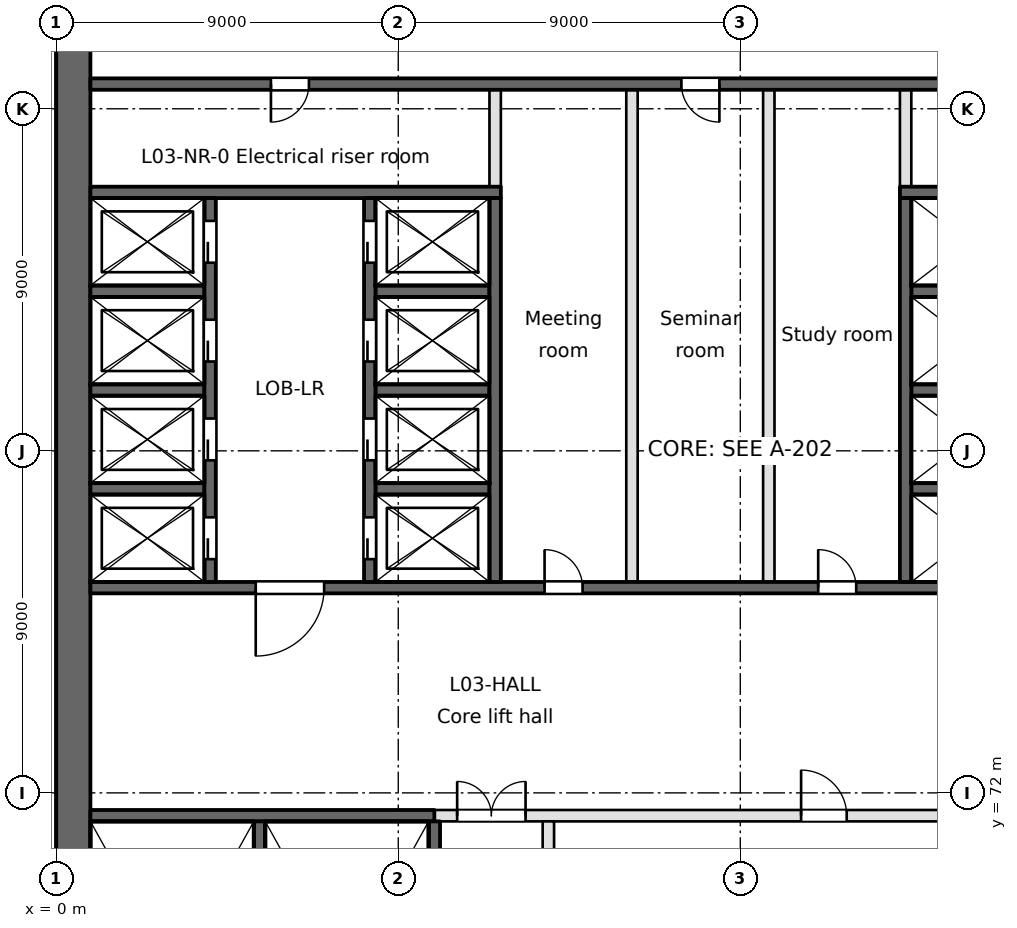
"""IFC4 building model, lengths in metres.
Left out: names, types, materials, properties, quantities, classifications, styles, units other than length and angle.
Written with IfcOpenShell. Run it as: python <this file> out.ifc"""

import sys

from ifc_helpers import new_model, si_unit, direction, frame, frame_2d, origin, place, context, subcontext, project, spatial, rectangle, extrude, element, fill, save


model = new_model("IFC4")
c1 = context("Model", 3, precision=1e-05, world=origin(), true_north=direction((0.0, 1.0)))
c2 = subcontext(c1, "Body", "Model", "MODEL_VIEW")
j1 = project(units=[si_unit("LENGTHUNIT", "METRE"), si_unit("PLANEANGLEUNIT", "RADIAN")], contexts=[c1])
p1 = place(None, origin())
s1 = spatial("IfcSite", under=j1, at=p1, CompositionType="ELEMENT")
p2 = place(p1, origin())
s2 = spatial("IfcBuilding", under=s1, at=p2, CompositionType="ELEMENT")
p3 = place(p2, frame((0.0, 0.0, 16.8)))
s3 = spatial("IfcBuildingStorey", under=s2, at=p3, CompositionType="ELEMENT", Elevation=16.8)
p4 = place(p3, frame((0.45, 94.5, 0.0), z_axis=(0.0, 0.0, 1.0), x_axis=(0.0, -1.0, 0.0)))
e1 = element("IfcWall", 1, at=p4, inside=s3, PredefinedType="SHEAR", context=c2, shape_type="SweptSolid", body=[
    extrude(rectangle(XDim=66.085, YDim=0.9, at=frame_2d((33.042, 0.0))), origin(), (0.0, 0.0, 1.0), 4.8),
])
p5 = place(p3, frame((0.9, 71.4, -0.35), z_axis=(0.0, 0.0, 1.0), x_axis=(1.0, 0.0, 0.0)))
e2 = element("IfcWall", 2, at=p5, inside=s3, PredefinedType="SOLIDWALL", context=c2, shape_type="SweptSolid", body=[
    extrude(rectangle(XDim=9.05, YDim=0.3, at=frame_2d((4.525, 0.0))), origin(), (0.0, 0.0, 1.0), 4.8),
])
p6 = place(p3, frame((9.95, 71.4, 0.0), z_axis=(0.0, 0.0, 1.0), x_axis=(1.0, 0.0, 0.0)))
e3 = element("IfcWall", 3, at=p6, inside=s3, PredefinedType="PARTITIONING", context=c2, shape_type="SweptSolid", body=[
    extrude(rectangle(XDim=17.65, YDim=0.3, at=frame_2d((8.825, 0.0))), origin(), (0.0, 0.0, 1.0), 4.45),
])
p7 = place(p6, frame((0.6, 0.0, 0.0)))
e4 = element("IfcOpeningElement", 4, at=p7, cuts=e3, PredefinedType="OPENING", context=c2, shape_type="SweptSolid", body=[
    extrude(rectangle(XDim=1.8, YDim=2.1, at=frame_2d((0.9, 1.05))), frame((0.0, 0.15, 0.0), z_axis=(0.0, -1.0, 0.0), x_axis=(1.0, 0.0, 0.0)), (0.0, 0.0, 1.0), 0.3),
])
p8 = place(p6, frame((9.65, 0.0, 0.0)))
e5 = element("IfcOpeningElement", 5, at=p8, cuts=e3, PredefinedType="OPENING", context=c2, shape_type="SweptSolid", body=[
    extrude(rectangle(XDim=1.2, YDim=2.1, at=frame_2d((0.6, 1.05))), frame((0.0, 0.15, 0.0), z_axis=(0.0, -1.0, 0.0), x_axis=(1.0, 0.0, 0.0)), (0.0, 0.0, 1.0), 0.3),
])
p9 = place(p3, frame((0.9, 77.4, -0.35), z_axis=(0.0, 0.0, 1.0), x_axis=(1.0, 0.0, 0.0)))
e6 = element("IfcWall", 6, at=p9, inside=s3, PredefinedType="SOLIDWALL", context=c2, shape_type="SweptSolid", body=[
    extrude(rectangle(XDim=28.95, YDim=0.3, at=frame_2d((14.475, 0.0))), origin(), (0.0, 0.0, 1.0), 4.8),
])
p10 = place(p9, frame((4.35, 0.0, 0.35)))
e7 = element("IfcOpeningElement", 7, at=p10, cuts=e6, PredefinedType="OPENING", context=c2, shape_type="SweptSolid", body=[
    extrude(rectangle(XDim=1.8, YDim=2.1, at=frame_2d((0.9, 1.05))), frame((0.0, 0.15, 0.0), z_axis=(0.0, -1.0, 0.0), x_axis=(1.0, 0.0, 0.0)), (0.0, 0.0, 1.0), 0.3),
])
p11 = place(p9, frame((25.95, 0.0, 0.35)))
e8 = element("IfcOpeningElement", 8, at=p11, cuts=e6, PredefinedType="OPENING", context=c2, shape_type="SweptSolid", body=[
    extrude(rectangle(XDim=1.8, YDim=2.1, at=frame_2d((0.9, 1.05))), frame((0.0, 0.15, 0.0), z_axis=(0.0, -1.0, 0.0), x_axis=(1.0, 0.0, 0.0)), (0.0, 0.0, 1.0), 0.3),
])
p12 = place(p9, frame((11.95, 0.0, 0.35)))
e9 = element("IfcOpeningElement", 9, at=p12, cuts=e6, PredefinedType="OPENING", context=c2, shape_type="SweptSolid", body=[
    extrude(rectangle(XDim=1.0, YDim=2.1, at=frame_2d((0.5, 1.05))), frame((0.0, 0.15, 0.0), z_axis=(0.0, -1.0, 0.0), x_axis=(1.0, 0.0, 0.0)), (0.0, 0.0, 1.0), 0.3),
])
p13 = place(p9, frame((19.15, 0.0, 0.35)))
e10 = element("IfcOpeningElement", 10, at=p13, cuts=e6, PredefinedType="OPENING", context=c2, shape_type="SweptSolid", body=[
    extrude(rectangle(XDim=1.0, YDim=2.1, at=frame_2d((0.5, 1.05))), frame((0.0, 0.15, 0.0), z_axis=(0.0, -1.0, 0.0), x_axis=(1.0, 0.0, 0.0)), (0.0, 0.0, 1.0), 0.3),
])
for number, where, z_axis, x_axis in (
    (11, (0.9, 80.0, -0.35), (0.0, 0.0, 1.0), (1.0, 0.0, 0.0)),
    (12, (8.4, 80.0, -0.35), (0.0, 0.0, 1.0), (1.0, 0.0, 0.0)),
    (13, (22.5, 80.0, -0.35), (0.0, 0.0, 1.0), (1.0, 0.0, 0.0)),
    (14, (0.9, 82.6, -0.35), (0.0, 0.0, 1.0), (1.0, 0.0, 0.0)),
    (15, (8.4, 82.6, -0.35), (0.0, 0.0, 1.0), (1.0, 0.0, 0.0)),
    (16, (22.5, 82.6, -0.35), (0.0, 0.0, 1.0), (1.0, 0.0, 0.0)),
    (17, (0.9, 85.2, -0.35), (0.0, 0.0, 1.0), (1.0, 0.0, 0.0)),
    (18, (8.4, 85.2, -0.35), (0.0, 0.0, 1.0), (1.0, 0.0, 0.0)),
    (19, (22.5, 85.2, -0.35), (0.0, 0.0, 1.0), (1.0, 0.0, 0.0)),
):
    element("IfcWall", number, at=place(p3, frame(where, z_axis=z_axis, x_axis=x_axis)), inside=s3, PredefinedType="SOLIDWALL", context=c2, shape_type="SweptSolid", body=[
        extrude(rectangle(XDim=3.0, YDim=0.3, at=frame_2d((1.5, 0.0))), origin(), (0.0, 0.0, 1.0), 4.8),
    ])
p14 = place(p3, frame((0.9, 87.8, -0.35), z_axis=(0.0, 0.0, 1.0), x_axis=(1.0, 0.0, 0.0)))
e20 = element("IfcWall", 20, at=p14, inside=s3, PredefinedType="SOLIDWALL", context=c2, shape_type="SweptSolid", body=[
    extrude(rectangle(XDim=10.8, YDim=0.3, at=frame_2d((5.4, 0.0))), origin(), (0.0, 0.0, 1.0), 4.8),
])
p15 = place(p3, frame((22.2, 87.8, -0.35), z_axis=(0.0, 0.0, 1.0), x_axis=(1.0, 0.0, 0.0)))
e21 = element("IfcWall", 21, at=p15, inside=s3, PredefinedType="SOLIDWALL", context=c2, shape_type="SweptSolid", body=[
    extrude(rectangle(XDim=7.8, YDim=0.3, at=frame_2d((3.9, 0.0))), origin(), (0.0, 0.0, 1.0), 4.8),
])
p16 = place(p3, frame((0.9, 90.65, -0.35), z_axis=(0.0, 0.0, 1.0), x_axis=(1.0, 0.0, 0.0)))
e22 = element("IfcWall", 22, at=p16, inside=s3, PredefinedType="SOLIDWALL", context=c2, shape_type="SweptSolid", body=[
    extrude(rectangle(XDim=34.6, YDim=0.3, at=frame_2d((17.3, 0.0))), origin(), (0.0, 0.0, 1.0), 4.8),
])
p17 = place(p16, frame((4.75, 0.0, 0.35)))
e23 = element("IfcOpeningElement", 23, at=p17, cuts=e22, PredefinedType="OPENING", context=c2, shape_type="SweptSolid", body=[
    extrude(rectangle(XDim=1.0, YDim=2.1, at=frame_2d((0.5, 1.05))), frame((0.0, 0.15, 0.0), z_axis=(0.0, -1.0, 0.0), x_axis=(1.0, 0.0, 0.0)), (0.0, 0.0, 1.0), 0.3),
])
p18 = place(p16, frame((24.7, 0.0, 0.35)))
e24 = element("IfcOpeningElement", 24, at=p18, cuts=e22, PredefinedType="OPENING", context=c2, shape_type="SweptSolid", body=[
    extrude(rectangle(XDim=1.0, YDim=2.1, at=frame_2d((0.5, 1.05))), frame((0.0, 0.15, 0.0), z_axis=(0.0, -1.0, 0.0), x_axis=(1.0, 0.0, 0.0)), (0.0, 0.0, 1.0), 0.3),
])
p19 = place(p16, frame((15.55, 0.0, 0.35)))
e25 = element("IfcOpeningElement", 25, at=p19, cuts=e22, PredefinedType="OPENING", context=c2, shape_type="SweptSolid", body=[
    extrude(rectangle(XDim=1.0, YDim=2.1, at=frame_2d((0.5, 1.05))), frame((0.0, 0.15, 0.0), z_axis=(0.0, -1.0, 0.0), x_axis=(1.0, 0.0, 0.0)), (0.0, 0.0, 1.0), 0.3),
])
p20 = place(p16, frame((31.4, 0.0, 0.35)))
e26 = element("IfcOpeningElement", 26, at=p20, cuts=e22, PredefinedType="OPENING", context=c2, shape_type="SweptSolid", body=[
    extrude(rectangle(XDim=1.0, YDim=2.1, at=frame_2d((0.5, 1.05))), frame((0.0, 0.15, 0.0), z_axis=(0.0, -1.0, 0.0), x_axis=(1.0, 0.0, 0.0)), (0.0, 0.0, 1.0), 0.3),
])
p21 = place(p3, frame((4.05, 77.55, -0.35), z_axis=(0.0, 0.0, 1.0), x_axis=(0.0, 1.0, 0.0)))
e27 = element("IfcWall", 27, at=p21, inside=s3, PredefinedType="SOLIDWALL", context=c2, shape_type="SweptSolid", body=[
    extrude(rectangle(XDim=10.1, YDim=0.3, at=frame_2d((5.05, 0.0))), origin(), (0.0, 0.0, 1.0), 4.8),
])
p22 = place(p21, frame((0.6, 0.0, 0.35)))
e28 = element("IfcOpeningElement", 28, at=p22, cuts=e27, PredefinedType="OPENING", context=c2, shape_type="SweptSolid", body=[
    extrude(rectangle(XDim=1.1, YDim=2.1, at=frame_2d((0.55, 1.05))), frame((0.0, 0.15, 0.0), z_axis=(0.0, -1.0, 0.0), x_axis=(1.0, 0.0, 0.0)), (0.0, 0.0, 1.0), 0.3),
])
p23 = place(p21, frame((3.2, 0.0, 0.35)))
e29 = element("IfcOpeningElement", 29, at=p23, cuts=e27, PredefinedType="OPENING", context=c2, shape_type="SweptSolid", body=[
    extrude(rectangle(XDim=1.1, YDim=2.1, at=frame_2d((0.55, 1.05))), frame((0.0, 0.15, 0.0), z_axis=(0.0, -1.0, 0.0), x_axis=(1.0, 0.0, 0.0)), (0.0, 0.0, 1.0), 0.3),
])
p24 = place(p21, frame((5.8, 0.0, 0.35)))
e30 = element("IfcOpeningElement", 30, at=p24, cuts=e27, PredefinedType="OPENING", context=c2, shape_type="SweptSolid", body=[
    extrude(rectangle(XDim=1.1, YDim=2.1, at=frame_2d((0.55, 1.05))), frame((0.0, 0.15, 0.0), z_axis=(0.0, -1.0, 0.0), x_axis=(1.0, 0.0, 0.0)), (0.0, 0.0, 1.0), 0.3),
])
p25 = place(p21, frame((8.4, 0.0, 0.35)))
e31 = element("IfcOpeningElement", 31, at=p25, cuts=e27, PredefinedType="OPENING", context=c2, shape_type="SweptSolid", body=[
    extrude(rectangle(XDim=1.1, YDim=2.1, at=frame_2d((0.55, 1.05))), frame((0.0, 0.15, 0.0), z_axis=(0.0, -1.0, 0.0), x_axis=(1.0, 0.0, 0.0)), (0.0, 0.0, 1.0), 0.3),
])
p26 = place(p3, frame((5.35, 63.5, -0.35), z_axis=(0.0, 0.0, 1.0), x_axis=(0.0, 1.0, 0.0)))
e32 = element("IfcWall", 32, at=p26, inside=s3, PredefinedType="SOLIDWALL", context=c2, shape_type="SweptSolid", body=[
    extrude(rectangle(XDim=7.75, YDim=0.3, at=frame_2d((3.875, 0.0))), origin(), (0.0, 0.0, 1.0), 4.8),
])
p27 = place(p3, frame((8.25, 77.55, -0.35), z_axis=(0.0, 0.0, 1.0), x_axis=(0.0, 1.0, 0.0)))
e33 = element("IfcWall", 33, at=p27, inside=s3, PredefinedType="SOLIDWALL", context=c2, shape_type="SweptSolid", body=[
    extrude(rectangle(XDim=10.1, YDim=0.3, at=frame_2d((5.05, 0.0))), origin(), (0.0, 0.0, 1.0), 4.8),
])
p28 = place(p27, frame((0.6, 0.0, 0.35)))
e34 = element("IfcOpeningElement", 34, at=p28, cuts=e33, PredefinedType="OPENING", context=c2, shape_type="SweptSolid", body=[
    extrude(rectangle(XDim=1.1, YDim=2.1, at=frame_2d((0.55, 1.05))), frame((0.0, 0.15, 0.0), z_axis=(0.0, -1.0, 0.0), x_axis=(1.0, 0.0, 0.0)), (0.0, 0.0, 1.0), 0.3),
])
p29 = place(p27, frame((3.2, 0.0, 0.35)))
e35 = element("IfcOpeningElement", 35, at=p29, cuts=e33, PredefinedType="OPENING", context=c2, shape_type="SweptSolid", body=[
    extrude(rectangle(XDim=1.1, YDim=2.1, at=frame_2d((0.55, 1.05))), frame((0.0, 0.15, 0.0), z_axis=(0.0, -1.0, 0.0), x_axis=(1.0, 0.0, 0.0)), (0.0, 0.0, 1.0), 0.3),
])
p30 = place(p27, frame((5.8, 0.0, 0.35)))
e36 = element("IfcOpeningElement", 36, at=p30, cuts=e33, PredefinedType="OPENING", context=c2, shape_type="SweptSolid", body=[
    extrude(rectangle(XDim=1.1, YDim=2.1, at=frame_2d((0.55, 1.05))), frame((0.0, 0.15, 0.0), z_axis=(0.0, -1.0, 0.0), x_axis=(1.0, 0.0, 0.0)), (0.0, 0.0, 1.0), 0.3),
])
p31 = place(p27, frame((8.4, 0.0, 0.35)))
e37 = element("IfcOpeningElement", 37, at=p31, cuts=e33, PredefinedType="OPENING", context=c2, shape_type="SweptSolid", body=[
    extrude(rectangle(XDim=1.1, YDim=2.1, at=frame_2d((0.55, 1.05))), frame((0.0, 0.15, 0.0), z_axis=(0.0, -1.0, 0.0), x_axis=(1.0, 0.0, 0.0)), (0.0, 0.0, 1.0), 0.3),
])
p32 = place(p3, frame((9.95, 63.5, -0.35), z_axis=(0.0, 0.0, 1.0), x_axis=(0.0, 1.0, 0.0)))
e38 = element("IfcWall", 38, at=p32, inside=s3, PredefinedType="SOLIDWALL", context=c2, shape_type="SweptSolid", body=[
    extrude(rectangle(XDim=7.75, YDim=0.3, at=frame_2d((3.875, 0.0))), origin(), (0.0, 0.0, 1.0), 4.8),
])
p33 = place(p3, frame((11.55, 77.55, -0.35), z_axis=(0.0, 0.0, 1.0), x_axis=(0.0, 1.0, 0.0)))
e39 = element("IfcWall", 39, at=p33, inside=s3, PredefinedType="SOLIDWALL", context=c2, shape_type="SweptSolid", body=[
    extrude(rectangle(XDim=10.1, YDim=0.3, at=frame_2d((5.05, 0.0))), origin(), (0.0, 0.0, 1.0), 4.8),
])
p34 = place(p3, frame((11.55, 87.95, 0.0), z_axis=(0.0, 0.0, 1.0), x_axis=(0.0, 1.0, 0.0)))
e40 = element("IfcWall", 40, at=p34, inside=s3, PredefinedType="PARTITIONING", context=c2, shape_type="SweptSolid", body=[
    extrude(rectangle(XDim=2.55, YDim=0.3, at=frame_2d((1.275, 0.0))), origin(), (0.0, 0.0, 1.0), 4.45),
])
p35 = place(p3, frame((12.95, 63.5, 0.0), z_axis=(0.0, 0.0, 1.0), x_axis=(0.0, 1.0, 0.0)))
e41 = element("IfcWall", 41, at=p35, inside=s3, PredefinedType="PARTITIONING", context=c2, shape_type="SweptSolid", body=[
    extrude(rectangle(XDim=7.75, YDim=0.3, at=frame_2d((3.875, 0.0))), origin(), (0.0, 0.0, 1.0), 4.45),
])
for number, where, z_axis, x_axis in (
    (42, (15.15, 77.55, 0.0), (0.0, 0.0, 1.0), (0.0, 1.0, 0.0)),
    (43, (18.75, 77.55, 0.0), (0.0, 0.0, 1.0), (0.0, 1.0, 0.0)),
):
    element("IfcWall", number, at=place(p3, frame(where, z_axis=z_axis, x_axis=x_axis)), inside=s3, PredefinedType="PARTITIONING", context=c2, shape_type="SweptSolid", body=[
        extrude(rectangle(XDim=12.95, YDim=0.3, at=frame_2d((6.475, 0.0))), origin(), (0.0, 0.0, 1.0), 4.45),
    ])
p36 = place(p3, frame((22.35, 77.55, -0.35), z_axis=(0.0, 0.0, 1.0), x_axis=(0.0, 1.0, 0.0)))
e44 = element("IfcWall", 44, at=p36, inside=s3, PredefinedType="SOLIDWALL", context=c2, shape_type="SweptSolid", body=[
    extrude(rectangle(XDim=10.1, YDim=0.3, at=frame_2d((5.05, 0.0))), origin(), (0.0, 0.0, 1.0), 4.8),
])
p37 = place(p3, frame((22.35, 87.95, 0.0), z_axis=(0.0, 0.0, 1.0), x_axis=(0.0, 1.0, 0.0)))
e45 = element("IfcWall", 45, at=p37, inside=s3, PredefinedType="PARTITIONING", context=c2, shape_type="SweptSolid", body=[
    extrude(rectangle(XDim=2.55, YDim=0.3, at=frame_2d((1.275, 0.0))), origin(), (0.0, 0.0, 1.0), 4.45),
])
p38 = place(p22, origin())
e46 = element("IfcDoor", 46, at=p38, inside=s3, OperationType="SLIDING_TO_RIGHT", PredefinedType="DOOR", context=c2, shape_type="SweptSolid", body=[
    extrude(rectangle(XDim=1.1, YDim=2.1, at=frame_2d((0.55, 1.05))), frame((0.0, 0.025, 0.0), z_axis=(0.0, -1.0, 0.0), x_axis=(1.0, 0.0, 0.0)), (0.0, 0.0, 1.0), 0.05),
])
fill(e28, e46)
p39 = place(p23, origin())
e47 = element("IfcDoor", 47, at=p39, inside=s3, OperationType="SLIDING_TO_LEFT", PredefinedType="DOOR", context=c2, shape_type="SweptSolid", body=[
    extrude(rectangle(XDim=1.1, YDim=2.1, at=frame_2d((0.55, 1.05))), frame((0.0, 0.025, 0.0), z_axis=(0.0, -1.0, 0.0), x_axis=(1.0, 0.0, 0.0)), (0.0, 0.0, 1.0), 0.05),
])
fill(e29, e47)
p40 = place(p24, origin())
e48 = element("IfcDoor", 48, at=p40, inside=s3, OperationType="SLIDING_TO_RIGHT", PredefinedType="DOOR", context=c2, shape_type="SweptSolid", body=[
    extrude(rectangle(XDim=1.1, YDim=2.1, at=frame_2d((0.55, 1.05))), frame((0.0, 0.025, 0.0), z_axis=(0.0, -1.0, 0.0), x_axis=(1.0, 0.0, 0.0)), (0.0, 0.0, 1.0), 0.05),
])
fill(e30, e48)
p41 = place(p25, origin())
e49 = element("IfcDoor", 49, at=p41, inside=s3, OperationType="SLIDING_TO_LEFT", PredefinedType="DOOR", context=c2, shape_type="SweptSolid", body=[
    extrude(rectangle(XDim=1.1, YDim=2.1, at=frame_2d((0.55, 1.05))), frame((0.0, 0.025, 0.0), z_axis=(0.0, -1.0, 0.0), x_axis=(1.0, 0.0, 0.0)), (0.0, 0.0, 1.0), 0.05),
])
fill(e31, e49)
p42 = place(p28, origin())
e50 = element("IfcDoor", 50, at=p42, inside=s3, OperationType="SLIDING_TO_RIGHT", PredefinedType="DOOR", context=c2, shape_type="SweptSolid", body=[
    extrude(rectangle(XDim=1.1, YDim=2.1, at=frame_2d((0.55, 1.05))), frame((0.0, 0.025, 0.0), z_axis=(0.0, -1.0, 0.0), x_axis=(1.0, 0.0, 0.0)), (0.0, 0.0, 1.0), 0.05),
])
fill(e34, e50)
p43 = place(p29, origin())
e51 = element("IfcDoor", 51, at=p43, inside=s3, OperationType="SLIDING_TO_LEFT", PredefinedType="DOOR", context=c2, shape_type="SweptSolid", body=[
    extrude(rectangle(XDim=1.1, YDim=2.1, at=frame_2d((0.55, 1.05))), frame((0.0, 0.025, 0.0), z_axis=(0.0, -1.0, 0.0), x_axis=(1.0, 0.0, 0.0)), (0.0, 0.0, 1.0), 0.05),
])
fill(e35, e51)
p44 = place(p30, origin())
e52 = element("IfcDoor", 52, at=p44, inside=s3, OperationType="SLIDING_TO_RIGHT", PredefinedType="DOOR", context=c2, shape_type="SweptSolid", body=[
    extrude(rectangle(XDim=1.1, YDim=2.1, at=frame_2d((0.55, 1.05))), frame((0.0, 0.025, 0.0), z_axis=(0.0, -1.0, 0.0), x_axis=(1.0, 0.0, 0.0)), (0.0, 0.0, 1.0), 0.05),
])
fill(e36, e52)
p45 = place(p31, origin())
e53 = element("IfcDoor", 53, at=p45, inside=s3, OperationType="SLIDING_TO_LEFT", PredefinedType="DOOR", context=c2, shape_type="SweptSolid", body=[
    extrude(rectangle(XDim=1.1, YDim=2.1, at=frame_2d((0.55, 1.05))), frame((0.0, 0.025, 0.0), z_axis=(0.0, -1.0, 0.0), x_axis=(1.0, 0.0, 0.0)), (0.0, 0.0, 1.0), 0.05),
])
fill(e37, e53)
p46 = place(p10, frame((1.8, 0.0, 0.0), z_axis=(0.0, 0.0, 1.0), x_axis=(-1.0, 0.0, 0.0)))
e54 = element("IfcDoor", 54, at=p46, inside=s3, OperationType="SINGLE_SWING_RIGHT", PredefinedType="DOOR", context=c2, shape_type="SweptSolid", body=[
    extrude(rectangle(XDim=1.8, YDim=2.1, at=frame_2d((0.9, 1.05))), frame((0.0, 0.025, 0.0), z_axis=(0.0, -1.0, 0.0), x_axis=(1.0, 0.0, 0.0)), (0.0, 0.0, 1.0), 0.05),
])
fill(e7, e54)
p47 = place(p7, origin())
e55 = element("IfcDoor", 55, at=p47, inside=s3, OperationType="DOUBLE_DOOR_SINGLE_SWING", PredefinedType="DOOR", context=c2, shape_type="SweptSolid", body=[
    extrude(rectangle(XDim=1.8, YDim=2.1, at=frame_2d((0.9, 1.05))), frame((0.0, 0.025, 0.0), z_axis=(0.0, -1.0, 0.0), x_axis=(1.0, 0.0, 0.0)), (0.0, 0.0, 1.0), 0.05),
])
fill(e4, e55)
p48 = place(p8, origin())
e56 = element("IfcDoor", 56, at=p48, inside=s3, OperationType="SINGLE_SWING_LEFT", PredefinedType="DOOR", context=c2, shape_type="SweptSolid", body=[
    extrude(rectangle(XDim=1.2, YDim=2.1, at=frame_2d((0.6, 1.05))), frame((0.0, 0.025, 0.0), z_axis=(0.0, -1.0, 0.0), x_axis=(1.0, 0.0, 0.0)), (0.0, 0.0, 1.0), 0.05),
])
fill(e5, e56)
p49 = place(p17, frame((1.0, 0.0, 0.0), z_axis=(0.0, 0.0, 1.0), x_axis=(-1.0, 0.0, 0.0)))
e57 = element("IfcDoor", 57, at=p49, inside=s3, OperationType="SINGLE_SWING_RIGHT", PredefinedType="DOOR", context=c2, shape_type="SweptSolid", body=[
    extrude(rectangle(XDim=1.0, YDim=2.1, at=frame_2d((0.5, 1.05))), frame((0.0, 0.025, 0.0), z_axis=(0.0, -1.0, 0.0), x_axis=(1.0, 0.0, 0.0)), (0.0, 0.0, 1.0), 0.05),
])
fill(e23, e57)
p50 = place(p12, origin())
e58 = element("IfcDoor", 58, at=p50, inside=s3, OperationType="SINGLE_SWING_LEFT", PredefinedType="DOOR", context=c2, shape_type="SweptSolid", body=[
    extrude(rectangle(XDim=1.0, YDim=2.1, at=frame_2d((0.5, 1.05))), frame((0.0, 0.025, 0.0), z_axis=(0.0, -1.0, 0.0), x_axis=(1.0, 0.0, 0.0)), (0.0, 0.0, 1.0), 0.05),
])
fill(e9, e58)
p51 = place(p19, frame((1.0, 0.0, 0.0), z_axis=(0.0, 0.0, 1.0), x_axis=(-1.0, 0.0, 0.0)))
e59 = element("IfcDoor", 59, at=p51, inside=s3, OperationType="SINGLE_SWING_LEFT", PredefinedType="DOOR", context=c2, shape_type="SweptSolid", body=[
    extrude(rectangle(XDim=1.0, YDim=2.1, at=frame_2d((0.5, 1.05))), frame((0.0, 0.025, 0.0), z_axis=(0.0, -1.0, 0.0), x_axis=(1.0, 0.0, 0.0)), (0.0, 0.0, 1.0), 0.05),
])
fill(e25, e59)
p52 = place(p13, origin())
e60 = element("IfcDoor", 60, at=p52, inside=s3, OperationType="SINGLE_SWING_LEFT", PredefinedType="DOOR", context=c2, shape_type="SweptSolid", body=[
    extrude(rectangle(XDim=1.0, YDim=2.1, at=frame_2d((0.5, 1.05))), frame((0.0, 0.025, 0.0), z_axis=(0.0, -1.0, 0.0), x_axis=(1.0, 0.0, 0.0)), (0.0, 0.0, 1.0), 0.05),
])
fill(e10, e60)
save(model, sys.argv[1])
